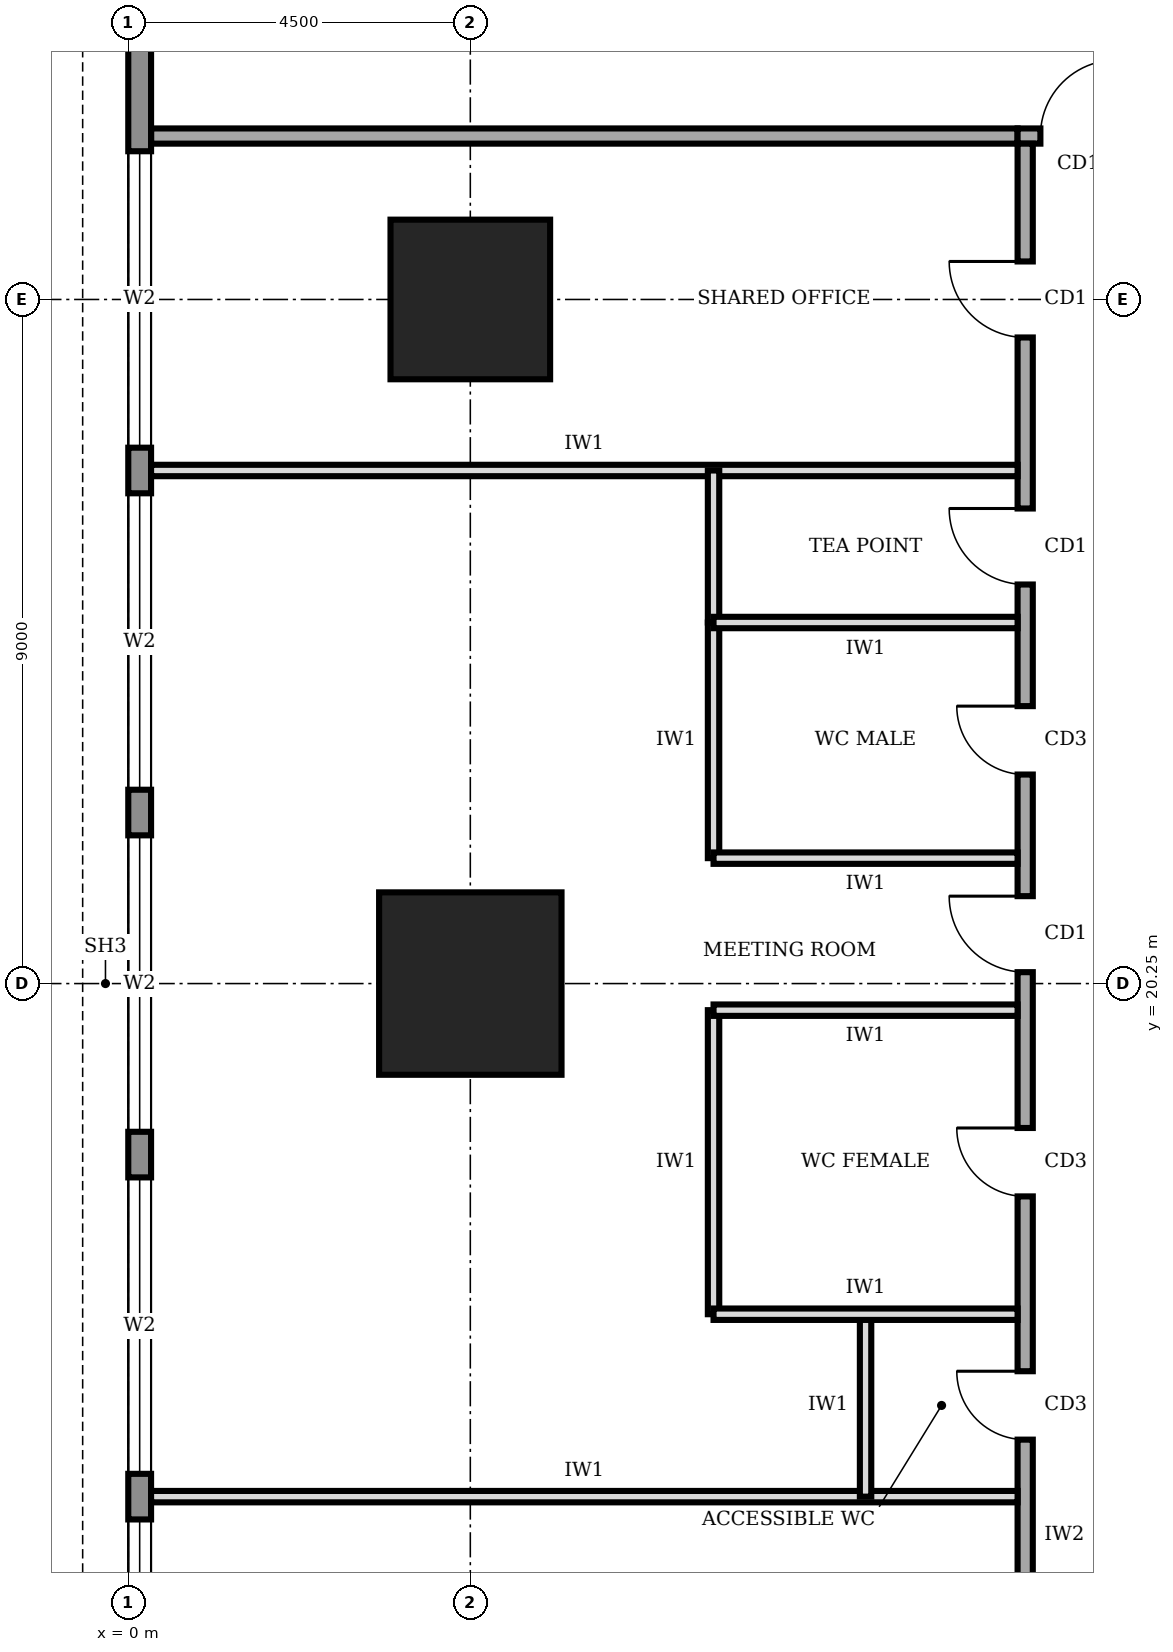
"""IFC4 building model, lengths in metres.
Left out: names, types, materials, properties, quantities, classifications, styles, units other than length and angle.
Written with IfcOpenShell. Run it as: python <this file> out.ifc"""

import sys

from ifc_helpers import new_model, si_unit, direction, frame, frame_2d, origin, origin_2d, place, context, subcontext, project, spatial, rectangle, extrude, element, fill, save


model = new_model("IFC4")
c1 = context("Model", 3, precision=1e-05, world=origin(), true_north=direction((0.0, 1.0)))
c2 = subcontext(c1, "Body", "Model", "MODEL_VIEW")
j1 = project(units=[si_unit("LENGTHUNIT", "METRE"), si_unit("PLANEANGLEUNIT", "RADIAN")], contexts=[c1])
p1 = place(None, origin())
s1 = spatial("IfcSite", under=j1, at=p1, CompositionType="ELEMENT")
p2 = place(p1, origin())
s2 = spatial("IfcBuilding", under=s1, at=p2, CompositionType="ELEMENT")
p3 = place(p2, frame((0.0, 0.0, 141.0)))
s3 = spatial("IfcBuildingStorey", under=s2, at=p3, CompositionType="ELEMENT", Elevation=141.0)
p4 = place(p3, frame((4.5, 20.25, 0.0), z_axis=(0.0, 0.0, 1.0), x_axis=(1.0, 0.0, 0.0)))
e1 = element("IfcColumn", 1, at=p4, inside=s3, PredefinedType="COLUMN", context=c2, shape_type="SweptSolid", body=[
    extrude(rectangle(XDim=2.4, YDim=2.4, at=origin_2d()), origin(), (0.0, 0.0, 1.0), 4.0),
])
p5 = place(p3, frame((4.5, 29.25, 0.0), z_axis=(0.0, 0.0, 1.0), x_axis=(1.0, 0.0, 0.0)))
e2 = element("IfcColumn", 2, at=p5, inside=s3, PredefinedType="COLUMN", context=c2, shape_type="SweptSolid", body=[
    extrude(rectangle(XDim=2.1, YDim=2.1, at=origin_2d()), origin(), (0.0, 0.0, 1.0), 4.0),
])
p6 = place(p3, frame((0.15, 35.98, 0.0), z_axis=(0.0, 0.0, 1.0), x_axis=(0.0, -1.0, 0.0)))
e3 = element("IfcWall", 3, at=p6, inside=s3, PredefinedType="STANDARD", context=c2, shape_type="SweptSolid", body=[
    extrude(rectangle(XDim=31.46, YDim=0.3, at=frame_2d((15.73, 0.0))), origin(), (0.0, 0.0, 1.0), 3.75),
])
p7 = place(p6, frame((27.28, 0.0, 0.6)))
e4 = element("IfcOpeningElement", 4, at=p7, cuts=e3, PredefinedType="OPENING", context=c2, shape_type="SweptSolid", body=[
    extrude(rectangle(XDim=3.9, YDim=2.6, at=frame_2d((1.95, 1.3))), frame((0.0, 0.16, 0.0), z_axis=(0.0, -1.0, 0.0), x_axis=(1.0, 0.0, 0.0)), (0.0, 0.0, 1.0), 0.32),
])
p8 = place(p6, frame((22.78, 0.0, 0.6)))
e5 = element("IfcOpeningElement", 5, at=p8, cuts=e3, PredefinedType="OPENING", context=c2, shape_type="SweptSolid", body=[
    extrude(rectangle(XDim=3.9, YDim=2.6, at=frame_2d((1.95, 1.3))), frame((0.0, 0.16, 0.0), z_axis=(0.0, -1.0, 0.0), x_axis=(1.0, 0.0, 0.0)), (0.0, 0.0, 1.0), 0.32),
])
p9 = place(p6, frame((18.28, 0.0, 0.6)))
e6 = element("IfcOpeningElement", 6, at=p9, cuts=e3, PredefinedType="OPENING", context=c2, shape_type="SweptSolid", body=[
    extrude(rectangle(XDim=3.9, YDim=2.6, at=frame_2d((1.95, 1.3))), frame((0.0, 0.16, 0.0), z_axis=(0.0, -1.0, 0.0), x_axis=(1.0, 0.0, 0.0)), (0.0, 0.0, 1.0), 0.32),
])
p10 = place(p6, frame((13.78, 0.0, 0.6)))
e7 = element("IfcOpeningElement", 7, at=p10, cuts=e3, PredefinedType="OPENING", context=c2, shape_type="SweptSolid", body=[
    extrude(rectangle(XDim=3.9, YDim=2.6, at=frame_2d((1.95, 1.3))), frame((0.0, 0.16, 0.0), z_axis=(0.0, -1.0, 0.0), x_axis=(1.0, 0.0, 0.0)), (0.0, 0.0, 1.0), 0.32),
])
p11 = place(p6, frame((9.28, 0.0, 0.6)))
e8 = element("IfcOpeningElement", 8, at=p11, cuts=e3, PredefinedType="OPENING", context=c2, shape_type="SweptSolid", body=[
    extrude(rectangle(XDim=3.9, YDim=2.6, at=frame_2d((1.95, 1.3))), frame((0.0, 0.16, 0.0), z_axis=(0.0, -1.0, 0.0), x_axis=(1.0, 0.0, 0.0)), (0.0, 0.0, 1.0), 0.32),
])
p12 = place(p6, frame((4.78, 0.0, 0.6)))
e9 = element("IfcOpeningElement", 9, at=p12, cuts=e3, PredefinedType="OPENING", context=c2, shape_type="SweptSolid", body=[
    extrude(rectangle(XDim=3.9, YDim=2.6, at=frame_2d((1.95, 1.3))), frame((0.0, 0.16, 0.0), z_axis=(0.0, -1.0, 0.0), x_axis=(1.0, 0.0, 0.0)), (0.0, 0.0, 1.0), 0.32),
])
p13 = place(p3, frame((40.2, 31.4, 0.0), z_axis=(0.0, 0.0, 1.0), x_axis=(-1.0, 0.0, 0.0)))
e10 = element("IfcWall", 10, at=p13, inside=s3, PredefinedType="SOLIDWALL", context=c2, shape_type="SweptSolid", body=[
    extrude(rectangle(XDim=28.5, YDim=0.2, at=frame_2d((14.25, 0.0))), origin(), (0.0, 0.0, 1.0), 3.75),
])
p14 = place(p13, frame((27.2, 0.0, 0.0)))
e11 = element("IfcOpeningElement", 11, at=p14, cuts=e10, PredefinedType="OPENING", context=c2, shape_type="SweptSolid", body=[
    extrude(rectangle(XDim=1.0, YDim=2.1, at=frame_2d((0.5, 1.05))), frame((0.0, 0.11, 0.0), z_axis=(0.0, -1.0, 0.0), x_axis=(1.0, 0.0, 0.0)), (0.0, 0.0, 1.0), 0.22),
])
p15 = place(p13, frame((23.95, 0.0, 0.0)))
e12 = element("IfcOpeningElement", 12, at=p15, cuts=e10, PredefinedType="OPENING", context=c2, shape_type="SweptSolid", body=[
    extrude(rectangle(XDim=1.0, YDim=2.1, at=frame_2d((0.5, 1.05))), frame((0.0, 0.11, 0.0), z_axis=(0.0, -1.0, 0.0), x_axis=(1.0, 0.0, 0.0)), (0.0, 0.0, 1.0), 0.22),
])
p16 = place(p13, frame((17.2, 0.0, 0.0)))
e13 = element("IfcOpeningElement", 13, at=p16, cuts=e10, PredefinedType="OPENING", context=c2, shape_type="SweptSolid", body=[
    extrude(rectangle(XDim=1.0, YDim=2.1, at=frame_2d((0.5, 1.05))), frame((0.0, 0.11, 0.0), z_axis=(0.0, -1.0, 0.0), x_axis=(1.0, 0.0, 0.0)), (0.0, 0.0, 1.0), 0.22),
])
p17 = place(p13, frame((5.6, 0.0, 0.0)))
e14 = element("IfcOpeningElement", 14, at=p17, cuts=e10, PredefinedType="OPENING", context=c2, shape_type="SweptSolid", body=[
    extrude(rectangle(XDim=1.8, YDim=2.1, at=frame_2d((0.9, 1.05))), frame((0.0, 0.11, 0.0), z_axis=(0.0, -1.0, 0.0), x_axis=(1.0, 0.0, 0.0)), (0.0, 0.0, 1.0), 0.22),
])
p18 = place(p3, frame((11.8, 31.3, 0.0), z_axis=(0.0, 0.0, 1.0), x_axis=(0.0, -1.0, 0.0)))
e15 = element("IfcWall", 15, at=p18, inside=s3, PredefinedType="SOLIDWALL", context=c2, shape_type="SweptSolid", body=[
    extrude(rectangle(XDim=22.3, YDim=0.2, at=frame_2d((11.15, 0.0))), origin(), (0.0, 0.0, 1.0), 3.75),
])
p19 = place(p18, frame((19.55, 0.0, 0.0)))
e16 = element("IfcOpeningElement", 16, at=p19, cuts=e15, PredefinedType="OPENING", context=c2, shape_type="SweptSolid", body=[
    extrude(rectangle(XDim=1.0, YDim=2.1, at=frame_2d((0.5, 1.05))), frame((0.0, 0.11, 0.0), z_axis=(0.0, -1.0, 0.0), x_axis=(1.0, 0.0, 0.0)), (0.0, 0.0, 1.0), 0.22),
])
p20 = place(p18, frame((16.15, 0.0, 0.0)))
e17 = element("IfcOpeningElement", 17, at=p20, cuts=e15, PredefinedType="OPENING", context=c2, shape_type="SweptSolid", body=[
    extrude(rectangle(XDim=0.9, YDim=2.1, at=frame_2d((0.45, 1.05))), frame((0.0, 0.11, 0.0), z_axis=(0.0, -1.0, 0.0), x_axis=(1.0, 0.0, 0.0)), (0.0, 0.0, 1.0), 0.22),
])
p21 = place(p18, frame((12.95, 0.0, 0.0)))
e18 = element("IfcOpeningElement", 18, at=p21, cuts=e15, PredefinedType="OPENING", context=c2, shape_type="SweptSolid", body=[
    extrude(rectangle(XDim=0.9, YDim=2.1, at=frame_2d((0.45, 1.05))), frame((0.0, 0.11, 0.0), z_axis=(0.0, -1.0, 0.0), x_axis=(1.0, 0.0, 0.0)), (0.0, 0.0, 1.0), 0.22),
])
p22 = place(p18, frame((7.4, 0.0, 0.0)))
e19 = element("IfcOpeningElement", 19, at=p22, cuts=e15, PredefinedType="OPENING", context=c2, shape_type="SweptSolid", body=[
    extrude(rectangle(XDim=0.9, YDim=2.1, at=frame_2d((0.45, 1.05))), frame((0.0, 0.11, 0.0), z_axis=(0.0, -1.0, 0.0), x_axis=(1.0, 0.0, 0.0)), (0.0, 0.0, 1.0), 0.22),
])
p23 = place(p18, frame((4.8, 0.0, 0.0)))
e20 = element("IfcOpeningElement", 20, at=p23, cuts=e15, PredefinedType="OPENING", context=c2, shape_type="SweptSolid", body=[
    extrude(rectangle(XDim=1.0, YDim=2.1, at=frame_2d((0.5, 1.05))), frame((0.0, 0.11, 0.0), z_axis=(0.0, -1.0, 0.0), x_axis=(1.0, 0.0, 0.0)), (0.0, 0.0, 1.0), 0.22),
])
p24 = place(p18, frame((9.9, 0.0, 0.0)))
e21 = element("IfcOpeningElement", 21, at=p24, cuts=e15, PredefinedType="OPENING", context=c2, shape_type="SweptSolid", body=[
    extrude(rectangle(XDim=1.0, YDim=2.1, at=frame_2d((0.5, 1.05))), frame((0.0, 0.11, 0.0), z_axis=(0.0, -1.0, 0.0), x_axis=(1.0, 0.0, 0.0)), (0.0, 0.0, 1.0), 0.22),
])
p25 = place(p18, frame((1.55, 0.0, 0.0)))
e22 = element("IfcOpeningElement", 22, at=p25, cuts=e15, PredefinedType="OPENING", context=c2, shape_type="SweptSolid", body=[
    extrude(rectangle(XDim=1.0, YDim=2.1, at=frame_2d((0.5, 1.05))), frame((0.0, 0.11, 0.0), z_axis=(0.0, -1.0, 0.0), x_axis=(1.0, 0.0, 0.0)), (0.0, 0.0, 1.0), 0.22),
])
p26 = place(p3, frame((0.3, 31.4, 0.0), z_axis=(0.0, 0.0, 1.0), x_axis=(1.0, 0.0, 0.0)))
e23 = element("IfcWall", 23, at=p26, inside=s3, PredefinedType="SOLIDWALL", context=c2, shape_type="SweptSolid", body=[
    extrude(rectangle(XDim=11.4, YDim=0.2, at=frame_2d((5.7, 0.0))), origin(), (0.0, 0.0, 1.0), 3.75),
])
for number, where, z_axis, x_axis in (
    (24, (0.3, 13.5, 0.0), (0.0, 0.0, 1.0), (1.0, 0.0, 0.0)),
    (25, (0.3, 27.0, 0.0), (0.0, 0.0, 1.0), (1.0, 0.0, 0.0)),
):
    element("IfcWall", number, at=place(p3, frame(where, z_axis=z_axis, x_axis=x_axis)), inside=s3, PredefinedType="PARTITIONING", context=c2, shape_type="SweptSolid", body=[
        extrude(rectangle(XDim=11.4, YDim=0.15, at=frame_2d((5.7, 0.0))), origin(), (0.0, 0.0, 1.0), 3.75),
    ])
p27 = place(p3, frame((11.7, 15.9, 0.0), z_axis=(0.0, 0.0, 1.0), x_axis=(-1.0, 0.0, 0.0)))
e26 = element("IfcWall", 26, at=p27, inside=s3, PredefinedType="PARTITIONING", context=c2, shape_type="SweptSolid", body=[
    extrude(rectangle(XDim=4.0, YDim=0.15, at=frame_2d((2.0, 0.0))), origin(), (0.0, 0.0, 1.0), 3.75),
])
p28 = place(p3, frame((11.7, 19.9, 0.0), z_axis=(0.0, 0.0, 1.0), x_axis=(-1.0, 0.0, 0.0)))
e27 = element("IfcWall", 27, at=p28, inside=s3, PredefinedType="PARTITIONING", context=c2, shape_type="SweptSolid", body=[
    extrude(rectangle(XDim=4.0, YDim=0.15, at=frame_2d((2.0, 0.0))), origin(), (0.0, 0.0, 1.0), 2.85),
])
for number, where, z_axis, x_axis in (
    (28, (11.7, 21.9, 0.0), (0.0, 0.0, 1.0), (-1.0, 0.0, 0.0)),
    (29, (11.7, 25.0, 0.0), (0.0, 0.0, 1.0), (-1.0, 0.0, 0.0)),
):
    element("IfcWall", number, at=place(p3, frame(where, z_axis=z_axis, x_axis=x_axis)), inside=s3, PredefinedType="PARTITIONING", context=c2, shape_type="SweptSolid", body=[
        extrude(rectangle(XDim=4.0, YDim=0.15, at=frame_2d((2.0, 0.0))), origin(), (0.0, 0.0, 1.0), 3.75),
    ])
p29 = place(p3, frame((9.7, 13.5, 0.0), z_axis=(0.0, 0.0, 1.0), x_axis=(0.0, 1.0, 0.0)))
e30 = element("IfcWall", 30, at=p29, inside=s3, PredefinedType="PARTITIONING", context=c2, shape_type="SweptSolid", body=[
    extrude(rectangle(XDim=2.4, YDim=0.15, at=frame_2d((1.2, 0.0))), origin(), (0.0, 0.0, 1.0), 3.75),
])
p30 = place(p3, frame((7.7, 15.9, 0.0), z_axis=(0.0, 0.0, 1.0), x_axis=(0.0, 1.0, 0.0)))
e31 = element("IfcWall", 31, at=p30, inside=s3, PredefinedType="PARTITIONING", context=c2, shape_type="SweptSolid", body=[
    extrude(rectangle(XDim=4.0, YDim=0.15, at=frame_2d((2.0, 0.0))), origin(), (0.0, 0.0, 1.0), 3.75),
])
p31 = place(p3, frame((7.7, 21.9, 0.0), z_axis=(0.0, 0.0, 1.0), x_axis=(0.0, 1.0, 0.0)))
e32 = element("IfcWall", 32, at=p31, inside=s3, PredefinedType="PARTITIONING", context=c2, shape_type="SweptSolid", body=[
    extrude(rectangle(XDim=3.1, YDim=0.15, at=frame_2d((1.55, 0.0))), origin(), (0.0, 0.0, 1.0), 3.75),
])
p32 = place(p3, frame((7.7, 25.0, 0.0), z_axis=(0.0, 0.0, 1.0), x_axis=(0.0, 1.0, 0.0)))
e33 = element("IfcWall", 33, at=p32, inside=s3, PredefinedType="PARTITIONING", context=c2, shape_type="SweptSolid", body=[
    extrude(rectangle(XDim=2.0, YDim=0.15, at=frame_2d((1.0, 0.0))), origin(), (0.0, 0.0, 1.0), 3.75),
])
p33 = place(p8, origin())
e34 = element("IfcWindow", 34, at=p33, inside=s3, PartitioningType="SINGLE_PANEL", PredefinedType="WINDOW", context=c2, shape_type="SweptSolid", body=[
    extrude(rectangle(XDim=3.9, YDim=2.6, at=frame_2d((1.95, 1.3))), frame((0.0, 0.03, 0.0), z_axis=(0.0, -1.0, 0.0), x_axis=(1.0, 0.0, 0.0)), (0.0, 0.0, 1.0), 0.06),
])
fill(e5, e34)
p34 = place(p9, origin())
e35 = element("IfcWindow", 35, at=p34, inside=s3, PartitioningType="SINGLE_PANEL", PredefinedType="WINDOW", context=c2, shape_type="SweptSolid", body=[
    extrude(rectangle(XDim=3.9, YDim=2.6, at=frame_2d((1.95, 1.3))), frame((0.0, 0.03, 0.0), z_axis=(0.0, -1.0, 0.0), x_axis=(1.0, 0.0, 0.0)), (0.0, 0.0, 1.0), 0.06),
])
fill(e6, e35)
p35 = place(p10, origin())
e36 = element("IfcWindow", 36, at=p35, inside=s3, PartitioningType="SINGLE_PANEL", PredefinedType="WINDOW", context=c2, shape_type="SweptSolid", body=[
    extrude(rectangle(XDim=3.9, YDim=2.6, at=frame_2d((1.95, 1.3))), frame((0.0, 0.03, 0.0), z_axis=(0.0, -1.0, 0.0), x_axis=(1.0, 0.0, 0.0)), (0.0, 0.0, 1.0), 0.06),
])
fill(e7, e36)
p36 = place(p11, origin())
e37 = element("IfcWindow", 37, at=p36, inside=s3, PartitioningType="SINGLE_PANEL", PredefinedType="WINDOW", context=c2, shape_type="SweptSolid", body=[
    extrude(rectangle(XDim=3.9, YDim=2.6, at=frame_2d((1.95, 1.3))), frame((0.0, 0.03, 0.0), z_axis=(0.0, -1.0, 0.0), x_axis=(1.0, 0.0, 0.0)), (0.0, 0.0, 1.0), 0.06),
])
fill(e8, e37)
p37 = place(p12, origin())
e38 = element("IfcWindow", 38, at=p37, inside=s3, PartitioningType="SINGLE_PANEL", PredefinedType="WINDOW", context=c2, shape_type="SweptSolid", body=[
    extrude(rectangle(XDim=3.9, YDim=2.6, at=frame_2d((1.95, 1.3))), frame((0.0, 0.03, 0.0), z_axis=(0.0, -1.0, 0.0), x_axis=(1.0, 0.0, 0.0)), (0.0, 0.0, 1.0), 0.06),
])
fill(e9, e38)
p38 = place(p14, frame((1.0, 0.0, 0.0), z_axis=(0.0, 0.0, 1.0), x_axis=(-1.0, 0.0, 0.0)))
e39 = element("IfcDoor", 39, at=p38, inside=s3, OperationType="SINGLE_SWING_RIGHT", PredefinedType="DOOR", context=c2, shape_type="SweptSolid", body=[
    extrude(rectangle(XDim=1.0, YDim=2.1, at=frame_2d((0.5, 1.05))), frame((0.0, 0.025, 0.0), z_axis=(0.0, -1.0, 0.0), x_axis=(1.0, 0.0, 0.0)), (0.0, 0.0, 1.0), 0.05),
])
fill(e11, e39)
p39 = place(p20, frame((0.9, 0.0, 0.0), z_axis=(0.0, 0.0, 1.0), x_axis=(-1.0, 0.0, 0.0)))
e40 = element("IfcDoor", 40, at=p39, inside=s3, OperationType="SINGLE_SWING_RIGHT", PredefinedType="DOOR", context=c2, shape_type="SweptSolid", body=[
    extrude(rectangle(XDim=0.9, YDim=2.1, at=frame_2d((0.45, 1.05))), frame((0.0, 0.025, 0.0), z_axis=(0.0, -1.0, 0.0), x_axis=(1.0, 0.0, 0.0)), (0.0, 0.0, 1.0), 0.05),
])
fill(e17, e40)
p40 = place(p21, frame((0.9, 0.0, 0.0), z_axis=(0.0, 0.0, 1.0), x_axis=(-1.0, 0.0, 0.0)))
e41 = element("IfcDoor", 41, at=p40, inside=s3, OperationType="SINGLE_SWING_RIGHT", PredefinedType="DOOR", context=c2, shape_type="SweptSolid", body=[
    extrude(rectangle(XDim=0.9, YDim=2.1, at=frame_2d((0.45, 1.05))), frame((0.0, 0.025, 0.0), z_axis=(0.0, -1.0, 0.0), x_axis=(1.0, 0.0, 0.0)), (0.0, 0.0, 1.0), 0.05),
])
fill(e18, e41)
p41 = place(p22, frame((0.9, 0.0, 0.0), z_axis=(0.0, 0.0, 1.0), x_axis=(-1.0, 0.0, 0.0)))
e42 = element("IfcDoor", 42, at=p41, inside=s3, OperationType="SINGLE_SWING_RIGHT", PredefinedType="DOOR", context=c2, shape_type="SweptSolid", body=[
    extrude(rectangle(XDim=0.9, YDim=2.1, at=frame_2d((0.45, 1.05))), frame((0.0, 0.025, 0.0), z_axis=(0.0, -1.0, 0.0), x_axis=(1.0, 0.0, 0.0)), (0.0, 0.0, 1.0), 0.05),
])
fill(e19, e42)
p42 = place(p23, frame((1.0, 0.0, 0.0), z_axis=(0.0, 0.0, 1.0), x_axis=(-1.0, 0.0, 0.0)))
e43 = element("IfcDoor", 43, at=p42, inside=s3, OperationType="SINGLE_SWING_RIGHT", PredefinedType="DOOR", context=c2, shape_type="SweptSolid", body=[
    extrude(rectangle(XDim=1.0, YDim=2.1, at=frame_2d((0.5, 1.05))), frame((0.0, 0.025, 0.0), z_axis=(0.0, -1.0, 0.0), x_axis=(1.0, 0.0, 0.0)), (0.0, 0.0, 1.0), 0.05),
])
fill(e20, e43)
p43 = place(p24, frame((1.0, 0.0, 0.0), z_axis=(0.0, 0.0, 1.0), x_axis=(-1.0, 0.0, 0.0)))
e44 = element("IfcDoor", 44, at=p43, inside=s3, OperationType="SINGLE_SWING_RIGHT", PredefinedType="DOOR", context=c2, shape_type="SweptSolid", body=[
    extrude(rectangle(XDim=1.0, YDim=2.1, at=frame_2d((0.5, 1.05))), frame((0.0, 0.025, 0.0), z_axis=(0.0, -1.0, 0.0), x_axis=(1.0, 0.0, 0.0)), (0.0, 0.0, 1.0), 0.05),
])
fill(e21, e44)
p44 = place(p25, frame((1.0, 0.0, 0.0), z_axis=(0.0, 0.0, 1.0), x_axis=(-1.0, 0.0, 0.0)))
e45 = element("IfcDoor", 45, at=p44, inside=s3, OperationType="SINGLE_SWING_RIGHT", PredefinedType="DOOR", context=c2, shape_type="SweptSolid", body=[
    extrude(rectangle(XDim=1.0, YDim=2.1, at=frame_2d((0.5, 1.05))), frame((0.0, 0.025, 0.0), z_axis=(0.0, -1.0, 0.0), x_axis=(1.0, 0.0, 0.0)), (0.0, 0.0, 1.0), 0.05),
])
fill(e22, e45)
save(model, sys.argv[1])
